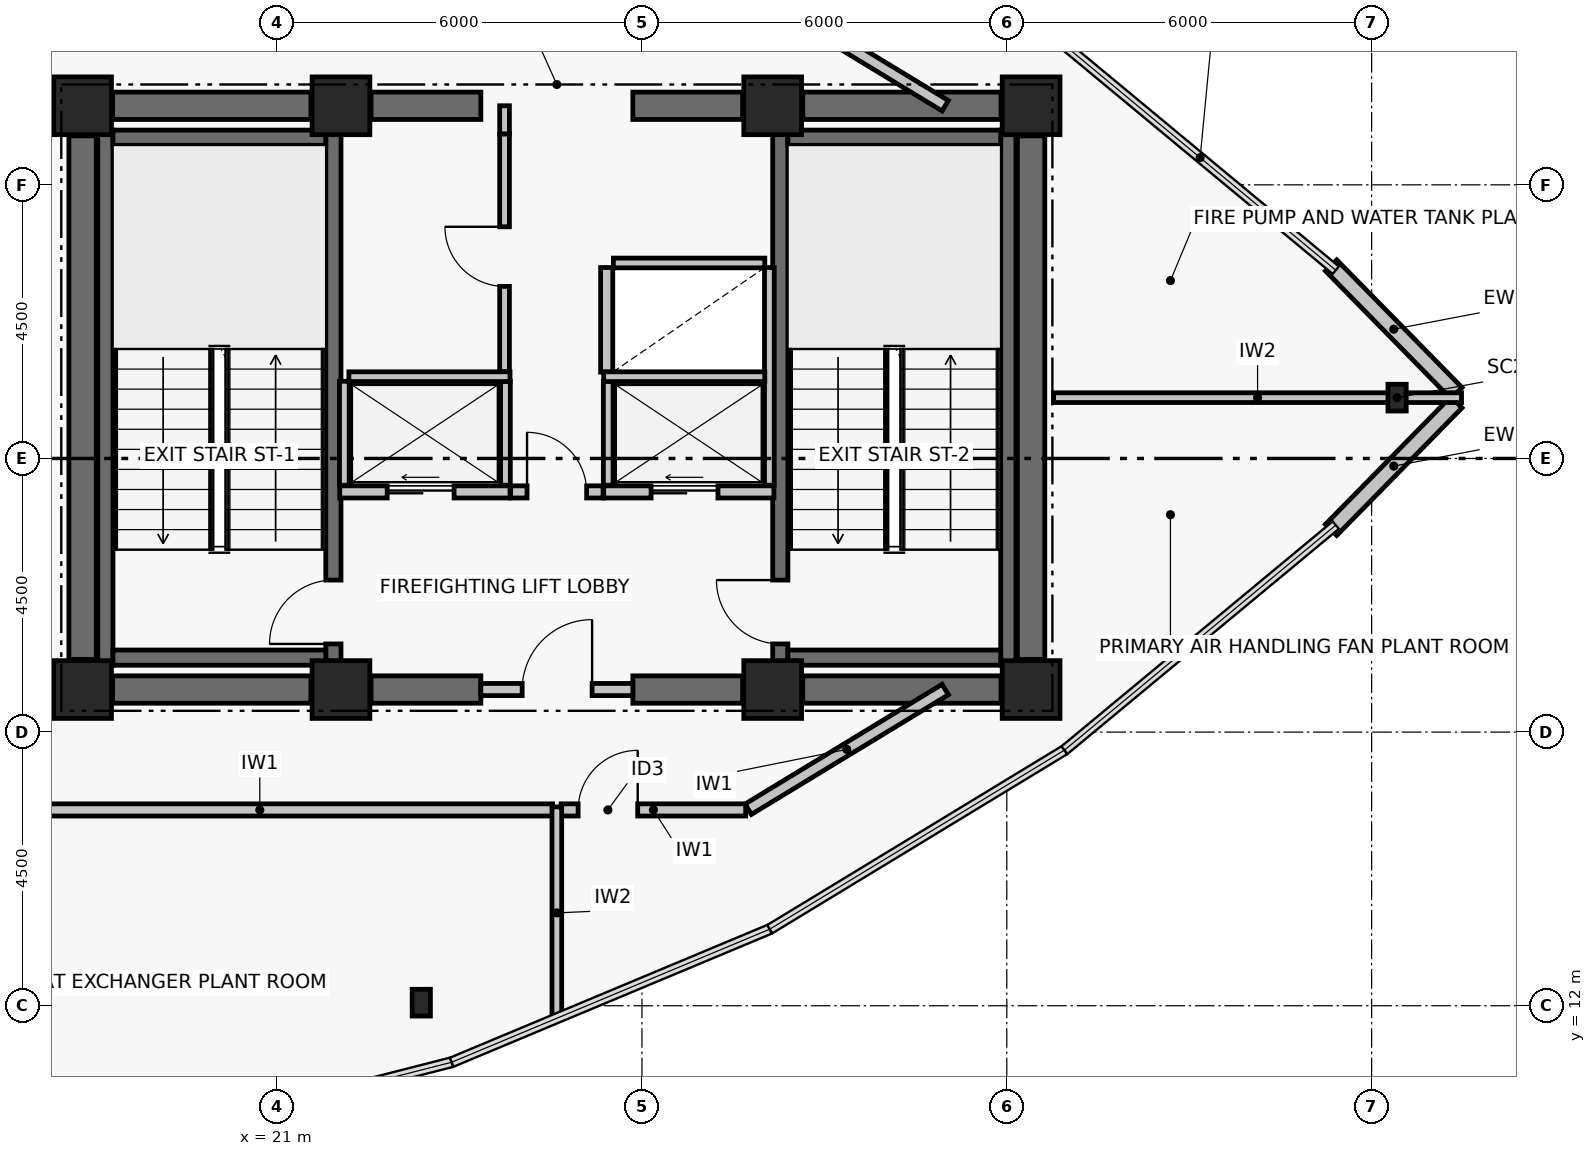
"""IFC4 building model, lengths in metres.
Left out: names, types, materials, properties, quantities, classifications, styles, units other than length and angle.
Written with IfcOpenShell. Run it as: python <this file> out.ifc"""

import sys

from ifc_helpers import new_model, si_unit, direction, frame, frame_2d, origin, origin_2d, place, context, subcontext, project, spatial, rectangle, i_section, extrude, element, fill, save


model = new_model("IFC4")
c1 = context("Model", 3, precision=1e-05, world=origin(), true_north=direction((0.0, 1.0)))
c2 = subcontext(c1, "Body", "Model", "MODEL_VIEW")
j1 = project(units=[si_unit("LENGTHUNIT", "METRE"), si_unit("PLANEANGLEUNIT", "RADIAN")], contexts=[c1])
p1 = place(None, origin())
s1 = spatial("IfcSite", under=j1, at=p1, CompositionType="ELEMENT")
p2 = place(p1, origin())
s2 = spatial("IfcBuilding", under=s1, at=p2, CompositionType="ELEMENT")
p3 = place(p2, frame((0.0, 0.0, 299.22)))
s3 = spatial("IfcBuildingStorey", under=s2, at=p3, CompositionType="ELEMENT", Elevation=299.22)
for number, where, z_axis, x_axis in (
    (1, (17.8, 17.2, 0.0), (0.0, 0.0, 1.0), (1.0, 0.0, 0.0)),
    (2, (22.05, 17.2, 0.0), (0.0, 0.0, 1.0), (1.0, 0.0, 0.0)),
    (3, (29.15, 17.2, 0.0), (0.0, 0.0, 1.0), (1.0, 0.0, 0.0)),
    (4, (33.4, 17.2, 0.0), (0.0, 0.0, 1.0), (1.0, 0.0, 0.0)),
    (5, (17.8, 26.8, 0.0), (0.0, 0.0, 1.0), (1.0, 0.0, 0.0)),
    (6, (22.05, 26.8, 0.0), (0.0, 0.0, 1.0), (1.0, 0.0, 0.0)),
    (7, (29.15, 26.8, 0.0), (0.0, 0.0, 1.0), (1.0, 0.0, 0.0)),
    (8, (33.4, 26.8, 0.0), (0.0, 0.0, 1.0), (1.0, 0.0, 0.0)),
):
    element("IfcColumn", number, at=place(p3, frame(where, z_axis=z_axis, x_axis=x_axis)), inside=s3, PredefinedType="COLUMN", context=c2, shape_type="SweptSolid", body=[
        extrude(rectangle(XDim=0.95, YDim=0.95, at=origin_2d()), origin(), (0.0, 0.0, 1.0), 3.2),
    ])
p4 = place(p3, frame((18.295, 17.2, 0.0), z_axis=(0.0, 0.0, 1.0), x_axis=(1.0, 0.0, 0.0)))
e9 = element("IfcWall", 9, at=p4, inside=s3, PredefinedType="SHEAR", context=c2, shape_type="SweptSolid", body=[
    extrude(rectangle(XDim=3.26, YDim=0.45, at=frame_2d((1.63, 0.0))), origin(), (0.0, 0.0, 1.0), 2.98),
])
p5 = place(p3, frame((22.545, 17.2, 0.0), z_axis=(0.0, 0.0, 1.0), x_axis=(1.0, 0.0, 0.0)))
e10 = element("IfcWall", 10, at=p5, inside=s3, PredefinedType="SHEAR", context=c2, shape_type="SweptSolid", body=[
    extrude(rectangle(XDim=1.805, YDim=0.45, at=frame_2d((0.903, 0.0))), origin(), (0.0, 0.0, 1.0), 2.98),
])
p6 = place(p3, frame((26.85, 17.2, 0.0), z_axis=(0.0, 0.0, 1.0), x_axis=(1.0, 0.0, 0.0)))
e11 = element("IfcWall", 11, at=p6, inside=s3, PredefinedType="SHEAR", context=c2, shape_type="SweptSolid", body=[
    extrude(rectangle(XDim=1.805, YDim=0.45, at=frame_2d((0.902, 0.0))), origin(), (0.0, 0.0, 1.0), 2.98),
])
for number, where, z_axis, x_axis in (
    (12, (29.645, 17.2, 0.0), (0.0, 0.0, 1.0), (1.0, 0.0, 0.0)),
    (13, (18.295, 26.8, 0.0), (0.0, 0.0, 1.0), (1.0, 0.0, 0.0)),
):
    element("IfcWall", number, at=place(p3, frame(where, z_axis=z_axis, x_axis=x_axis)), inside=s3, PredefinedType="SHEAR", context=c2, shape_type="SweptSolid", body=[
        extrude(rectangle(XDim=3.26, YDim=0.45, at=frame_2d((1.63, 0.0))), origin(), (0.0, 0.0, 1.0), 2.98),
    ])
p7 = place(p3, frame((22.545, 26.8, 0.0), z_axis=(0.0, 0.0, 1.0), x_axis=(1.0, 0.0, 0.0)))
e14 = element("IfcWall", 14, at=p7, inside=s3, PredefinedType="SHEAR", context=c2, shape_type="SweptSolid", body=[
    extrude(rectangle(XDim=1.805, YDim=0.45, at=frame_2d((0.903, 0.0))), origin(), (0.0, 0.0, 1.0), 2.98),
])
p8 = place(p3, frame((26.85, 26.8, 0.0), z_axis=(0.0, 0.0, 1.0), x_axis=(1.0, 0.0, 0.0)))
e15 = element("IfcWall", 15, at=p8, inside=s3, PredefinedType="SHEAR", context=c2, shape_type="SweptSolid", body=[
    extrude(rectangle(XDim=1.805, YDim=0.45, at=frame_2d((0.902, 0.0))), origin(), (0.0, 0.0, 1.0), 2.98),
])
p9 = place(p3, frame((29.645, 26.8, 0.0), z_axis=(0.0, 0.0, 1.0), x_axis=(1.0, 0.0, 0.0)))
e16 = element("IfcWall", 16, at=p9, inside=s3, PredefinedType="SHEAR", context=c2, shape_type="SweptSolid", body=[
    extrude(rectangle(XDim=3.26, YDim=0.45, at=frame_2d((1.63, 0.0))), origin(), (0.0, 0.0, 1.0), 2.98),
])
for number, where, z_axis, x_axis in (
    (17, (17.8, 17.695, 0.0), (0.0, 0.0, 1.0), (0.0, 1.0, 0.0)),
    (18, (33.4, 17.695, 0.0), (0.0, 0.0, 1.0), (0.0, 1.0, 0.0)),
):
    element("IfcWall", number, at=place(p3, frame(where, z_axis=z_axis, x_axis=x_axis)), inside=s3, PredefinedType="SHEAR", context=c2, shape_type="SweptSolid", body=[
        extrude(rectangle(XDim=8.61, YDim=0.45, at=frame_2d((4.305, 0.0))), origin(), (0.0, 0.0, 1.0), 2.98),
    ])
p10 = place(p3, frame((18.175, 17.6, 0.0), z_axis=(0.0, 0.0, 1.0), x_axis=(0.0, 1.0, 0.0)))
e19 = element("IfcWall", 19, at=p10, inside=s3, PredefinedType="SHEAR", context=c2, shape_type="SweptSolid", body=[
    extrude(rectangle(XDim=8.8, YDim=0.25, at=frame_2d((4.4, 0.0))), origin(), (0.0, 0.0, 1.0), 2.98),
])
p11 = place(p3, frame((21.925, 17.6, 0.0), z_axis=(0.0, 0.0, 1.0), x_axis=(0.0, 1.0, 0.0)))
e20 = element("IfcWall", 20, at=p11, inside=s3, PredefinedType="SHEAR", context=c2, shape_type="SweptSolid", body=[
    extrude(rectangle(XDim=8.8, YDim=0.25, at=frame_2d((4.4, 0.0))), origin(), (0.0, 0.0, 1.0), 2.98),
])
p12 = place(p11, frame((0.35, 0.0, 0.0)))
e21 = element("IfcOpeningElement", 21, at=p12, cuts=e20, PredefinedType="OPENING", context=c2, shape_type="SweptSolid", body=[
    extrude(rectangle(XDim=1.05, YDim=2.08, at=frame_2d((0.525, 1.04))), frame((0.0, 0.135, 0.0), z_axis=(0.0, -1.0, 0.0), x_axis=(1.0, 0.0, 0.0)), (0.0, 0.0, 1.0), 0.27),
])
for number, where, z_axis, x_axis in (
    (22, (18.3, 17.725, 0.0), (0.0, 0.0, 1.0), (1.0, 0.0, 0.0)),
    (23, (18.3, 26.275, 0.0), (0.0, 0.0, 1.0), (1.0, 0.0, 0.0)),
):
    element("IfcWall", number, at=place(p3, frame(where, z_axis=z_axis, x_axis=x_axis)), inside=s3, PredefinedType="SHEAR", context=c2, shape_type="SweptSolid", body=[
        extrude(rectangle(XDim=3.5, YDim=0.25, at=frame_2d((1.75, 0.0))), origin(), (0.0, 0.0, 1.0), 2.98),
    ])
p13 = place(p3, frame((29.275, 17.6, 0.0), z_axis=(0.0, 0.0, 1.0), x_axis=(0.0, 1.0, 0.0)))
e24 = element("IfcWall", 24, at=p13, inside=s3, PredefinedType="SHEAR", context=c2, shape_type="SweptSolid", body=[
    extrude(rectangle(XDim=8.8, YDim=0.25, at=frame_2d((4.4, 0.0))), origin(), (0.0, 0.0, 1.0), 2.98),
])
p14 = place(p13, frame((0.35, 0.0, 0.0)))
e25 = element("IfcOpeningElement", 25, at=p14, cuts=e24, PredefinedType="OPENING", context=c2, shape_type="SweptSolid", body=[
    extrude(rectangle(XDim=1.05, YDim=2.08, at=frame_2d((0.525, 1.04))), frame((0.0, 0.135, 0.0), z_axis=(0.0, -1.0, 0.0), x_axis=(1.0, 0.0, 0.0)), (0.0, 0.0, 1.0), 0.27),
])
p15 = place(p3, frame((33.025, 17.6, 0.0), z_axis=(0.0, 0.0, 1.0), x_axis=(0.0, 1.0, 0.0)))
e26 = element("IfcWall", 26, at=p15, inside=s3, PredefinedType="SHEAR", context=c2, shape_type="SweptSolid", body=[
    extrude(rectangle(XDim=8.8, YDim=0.25, at=frame_2d((4.4, 0.0))), origin(), (0.0, 0.0, 1.0), 2.98),
])
for number, where, z_axis, x_axis in (
    (27, (29.4, 17.725, 0.0), (0.0, 0.0, 1.0), (1.0, 0.0, 0.0)),
    (28, (29.4, 26.275, 0.0), (0.0, 0.0, 1.0), (1.0, 0.0, 0.0)),
):
    element("IfcWall", number, at=place(p3, frame(where, z_axis=z_axis, x_axis=x_axis)), inside=s3, PredefinedType="SHEAR", context=c2, shape_type="SweptSolid", body=[
        extrude(rectangle(XDim=3.5, YDim=0.25, at=frame_2d((1.75, 0.0))), origin(), (0.0, 0.0, 1.0), 2.98),
    ])
for number, where, z_axis, x_axis in (
    (29, (39.419, 22.0, 0.0), (0.0, 0.0, 1.0), (1.0, 0.0, 0.0)),
    (30, (23.371, 12.051, 0.0), (0.0, 0.0, 1.0), (1.0, 0.0, 0.0)),
):
    element("IfcColumn", number, at=place(p3, frame(where, z_axis=z_axis, x_axis=x_axis)), inside=s3, PredefinedType="COLUMN", context=c2, shape_type="SweptSolid", body=[
        extrude(i_section(OverallWidth=0.3, OverallDepth=0.44, WebThickness=0.011, FlangeThickness=0.018, at=origin_2d()), origin(), (0.0, 0.0, 1.0), 3.2),
    ])
for number, where, z_axis, x_axis in (
    (31, (40.394, 21.924, 0.0), (0.0, 0.0, 1.0), (-0.701, -0.714, 0.0)),
    (32, (38.333, 24.175, 0.0), (0.0, 0.0, 1.0), (0.701, -0.714, 0.0)),
):
    element("IfcWall", number, at=place(p3, frame(where, z_axis=z_axis, x_axis=x_axis)), inside=s3, PredefinedType="PARTITIONING", context=c2, shape_type="SweptSolid", body=[
        extrude(rectangle(XDim=2.941, YDim=0.26, at=frame_2d((1.471, 0.0))), origin(), (0.0, 0.0, 1.0), 2.98),
    ])
p16 = place(p3, frame((24.35, 17.2, 0.0), z_axis=(0.0, 0.0, 1.0), x_axis=(1.0, 0.0, 0.0)))
e33 = element("IfcWall", 33, at=p16, inside=s3, PredefinedType="PARTITIONING", context=c2, shape_type="SweptSolid", body=[
    extrude(rectangle(XDim=2.5, YDim=0.2, at=frame_2d((1.25, 0.0))), origin(), (0.0, 0.0, 1.0), 2.11),
])
p17 = place(p16, frame((0.68, 0.0, 0.0)))
e34 = element("IfcOpeningElement", 34, at=p17, cuts=e33, PredefinedType="OPENING", context=c2, shape_type="SweptSolid", body=[
    extrude(rectangle(XDim=1.15, YDim=2.08, at=frame_2d((0.575, 1.04))), frame((0.0, 0.11, 0.0), z_axis=(0.0, -1.0, 0.0), x_axis=(1.0, 0.0, 0.0)), (0.0, 0.0, 1.0), 0.22),
])
p18 = place(p3, frame((24.84, 20.45, 0.0), z_axis=(0.0, 0.0, 1.0), x_axis=(1.0, 0.0, 0.0)))
e35 = element("IfcWall", 35, at=p18, inside=s3, PredefinedType="PARTITIONING", context=c2, shape_type="SweptSolid", body=[
    extrude(rectangle(XDim=1.52, YDim=0.2, at=frame_2d((0.76, 0.0))), origin(), (0.0, 0.0, 1.0), 2.98),
])
p19 = place(p18, frame((0.27, 0.0, 0.0)))
e36 = element("IfcOpeningElement", 36, at=p19, cuts=e35, PredefinedType="OPENING", context=c2, shape_type="SweptSolid", body=[
    extrude(rectangle(XDim=0.98, YDim=2.06, at=frame_2d((0.49, 1.03))), frame((0.0, 0.11, 0.0), z_axis=(0.0, -1.0, 0.0), x_axis=(1.0, 0.0, 0.0)), (0.0, 0.0, 1.0), 0.22),
])
p20 = place(p3, frame((22.03, 20.45, 0.0), z_axis=(0.0, 0.0, 1.0), x_axis=(1.0, 0.0, 0.0)))
e37 = element("IfcWall", 37, at=p20, inside=s3, PredefinedType="PARTITIONING", context=c2, shape_type="SweptSolid", body=[
    extrude(rectangle(XDim=2.8, YDim=0.2, at=frame_2d((1.4, 0.0))), origin(), (0.0, 0.0, 1.0), 2.98),
])
p21 = place(p20, frame((0.78, 0.0, 0.0)))
e38 = element("IfcOpeningElement", 38, at=p21, cuts=e37, PredefinedType="OPENING", context=c2, shape_type="SweptSolid", body=[
    extrude(rectangle(XDim=1.1, YDim=2.08, at=frame_2d((0.55, 1.04))), frame((0.0, 0.11, 0.0), z_axis=(0.0, -1.0, 0.0), x_axis=(1.0, 0.0, 0.0)), (0.0, 0.0, 1.0), 0.22),
])
p22 = place(p3, frame((26.37, 20.45, 0.0), z_axis=(0.0, 0.0, 1.0), x_axis=(1.0, 0.0, 0.0)))
e39 = element("IfcWall", 39, at=p22, inside=s3, PredefinedType="PARTITIONING", context=c2, shape_type="SweptSolid", body=[
    extrude(rectangle(XDim=2.8, YDim=0.2, at=frame_2d((1.4, 0.0))), origin(), (0.0, 0.0, 1.0), 2.98),
])
p23 = place(p22, frame((0.78, 0.0, 0.0)))
e40 = element("IfcOpeningElement", 40, at=p23, cuts=e39, PredefinedType="OPENING", context=c2, shape_type="SweptSolid", body=[
    extrude(rectangle(XDim=1.1, YDim=2.08, at=frame_2d((0.55, 1.04))), frame((0.0, 0.11, 0.0), z_axis=(0.0, -1.0, 0.0), x_axis=(1.0, 0.0, 0.0)), (0.0, 0.0, 1.0), 0.22),
])
p24 = place(p3, frame((26.42, 22.42, 0.0), z_axis=(0.0, 0.0, 1.0), x_axis=(0.0, 1.0, 0.0)))
e41 = element("IfcWall", 41, at=p24, inside=s3, PredefinedType="PARTITIONING", context=c2, shape_type="SweptSolid", body=[
    extrude(rectangle(XDim=1.72, YDim=0.2, at=frame_2d((0.86, 0.0))), origin(), (0.0, 0.0, 1.0), 2.98),
])
for number, where, z_axis, x_axis in (
    (42, (22.105, 20.56, 0.0), (0.0, 0.0, 1.0), (0.0, 1.0, 0.0)),
    (43, (24.755, 20.56, 0.0), (0.0, 0.0, 1.0), (0.0, 1.0, 0.0)),
):
    element("IfcWall", number, at=place(p3, frame(where, z_axis=z_axis, x_axis=x_axis)), inside=s3, PredefinedType="PARTITIONING", context=c2, shape_type="SweptSolid", body=[
        extrude(rectangle(XDim=1.71, YDim=0.16, at=frame_2d((0.855, 0.0))), origin(), (0.0, 0.0, 1.0), 2.98),
    ])
p25 = place(p3, frame((22.18, 22.345, 0.0), z_axis=(0.0, 0.0, 1.0), x_axis=(1.0, 0.0, 0.0)))
e44 = element("IfcWall", 44, at=p25, inside=s3, PredefinedType="PARTITIONING", context=c2, shape_type="SweptSolid", body=[
    extrude(rectangle(XDim=2.65, YDim=0.16, at=frame_2d((1.325, 0.0))), origin(), (0.0, 0.0, 1.0), 2.98),
])
p26 = place(p3, frame((29.095, 20.56, 0.0), z_axis=(0.0, 0.0, 1.0), x_axis=(0.0, 1.0, 0.0)))
e45 = element("IfcWall", 45, at=p26, inside=s3, PredefinedType="PARTITIONING", context=c2, shape_type="SweptSolid", body=[
    extrude(rectangle(XDim=3.58, YDim=0.16, at=frame_2d((1.79, 0.0))), origin(), (0.0, 0.0, 1.0), 2.98),
])
p27 = place(p3, frame((26.445, 20.56, 0.0), z_axis=(0.0, 0.0, 1.0), x_axis=(0.0, 1.0, 0.0)))
e46 = element("IfcWall", 46, at=p27, inside=s3, PredefinedType="PARTITIONING", context=c2, shape_type="SweptSolid", body=[
    extrude(rectangle(XDim=1.71, YDim=0.16, at=frame_2d((0.855, 0.0))), origin(), (0.0, 0.0, 1.0), 2.98),
])
p28 = place(p3, frame((26.37, 22.345, 0.0), z_axis=(0.0, 0.0, 1.0), x_axis=(1.0, 0.0, 0.0)))
e47 = element("IfcWall", 47, at=p28, inside=s3, PredefinedType="PARTITIONING", context=c2, shape_type="SweptSolid", body=[
    extrude(rectangle(XDim=2.65, YDim=0.16, at=frame_2d((1.325, 0.0))), origin(), (0.0, 0.0, 1.0), 2.98),
])
p29 = place(p3, frame((26.53, 24.215, 0.0), z_axis=(0.0, 0.0, 1.0), x_axis=(1.0, 0.0, 0.0)))
e48 = element("IfcWall", 48, at=p29, inside=s3, PredefinedType="PARTITIONING", context=c2, shape_type="SweptSolid", body=[
    extrude(rectangle(XDim=2.49, YDim=0.16, at=frame_2d((1.245, 0.0))), origin(), (0.0, 0.0, 1.0), 2.98),
])
p30 = place(p3, frame((24.74, 26.335, 0.0), z_axis=(0.0, 0.0, 1.0), x_axis=(0.0, 1.0, 0.0)))
e49 = element("IfcWall", 49, at=p30, inside=s3, PredefinedType="PARTITIONING", context=c2, shape_type="SweptSolid", body=[
    extrude(rectangle(XDim=0.465, YDim=0.16, at=frame_2d((0.232, 0.0))), origin(), (0.0, 0.0, 1.0), 2.11),
])
p31 = place(p3, frame((24.74, 22.43, 0.0), z_axis=(0.0, 0.0, 1.0), x_axis=(0.0, 1.0, 0.0)))
e50 = element("IfcWall", 50, at=p31, inside=s3, PredefinedType="PARTITIONING", context=c2, shape_type="SweptSolid", body=[
    extrude(rectangle(XDim=3.905, YDim=0.16, at=frame_2d((1.953, 0.0))), origin(), (0.0, 0.0, 1.0), 2.98),
])
p32 = place(p31, frame((1.4, 0.0, 0.0)))
e51 = element("IfcOpeningElement", 51, at=p32, cuts=e50, PredefinedType="OPENING", context=c2, shape_type="SweptSolid", body=[
    extrude(rectangle(XDim=0.98, YDim=2.06, at=frame_2d((0.49, 1.03))), frame((0.0, 0.09, 0.0), z_axis=(0.0, -1.0, 0.0), x_axis=(1.0, 0.0, 0.0)), (0.0, 0.0, 1.0), 0.18),
])
p33 = place(p3, frame((15.9, 15.22, 0.0), z_axis=(0.0, 0.0, 1.0), x_axis=(1.0, 0.0, 0.0)))
e52 = element("IfcWall", 52, at=p33, inside=s3, PredefinedType="PARTITIONING", context=c2, shape_type="SweptSolid", body=[
    extrude(rectangle(XDim=9.63, YDim=0.2, at=frame_2d((4.815, 0.0))), origin(), (0.0, 0.0, 1.0), 2.31),
])
p34 = place(p3, frame((25.67, 15.22, 0.0), z_axis=(0.0, 0.0, 1.0), x_axis=(1.0, 0.0, 0.0)))
e53 = element("IfcWall", 53, at=p34, inside=s3, PredefinedType="PARTITIONING", context=c2, shape_type="SweptSolid", body=[
    extrude(rectangle(XDim=3.036, YDim=0.2, at=frame_2d((1.518, 0.0))), origin(), (0.0, 0.0, 1.0), 2.98),
])
p35 = place(p34, frame((0.28, 0.0, 0.0)))
e54 = element("IfcOpeningElement", 54, at=p35, cuts=e53, PredefinedType="OPENING", context=c2, shape_type="SweptSolid", body=[
    extrude(rectangle(XDim=0.98, YDim=2.06, at=frame_2d((0.49, 1.03))), frame((0.0, 0.11, 0.0), z_axis=(0.0, -1.0, 0.0), x_axis=(1.0, 0.0, 0.0)), (0.0, 0.0, 1.0), 0.22),
])
for number, where, z_axis, x_axis in (
    (55, (28.747, 15.232, 0.0), (0.0, 0.0, 1.0), (0.855, 0.519, 0.0)),
    (56, (31.988, 26.8, 0.0), (0.0, 0.0, 1.0), (-0.855, 0.519, 0.0)),
):
    element("IfcWall", number, at=place(p3, frame(where, z_axis=z_axis, x_axis=x_axis)), inside=s3, PredefinedType="PARTITIONING", context=c2, shape_type="SweptSolid", body=[
        extrude(rectangle(XDim=3.792, YDim=0.2, at=frame_2d((1.896, 0.0))), origin(), (0.0, 0.0, 1.0), 2.11),
    ])
p36 = place(p3, frame((25.6, 11.783, 0.0), z_axis=(0.0, 0.0, 1.0), x_axis=(0.0, 1.0, 0.0)))
e57 = element("IfcWall", 57, at=p36, inside=s3, PredefinedType="PARTITIONING", context=c2, shape_type="SweptSolid", body=[
    extrude(rectangle(XDim=3.487, YDim=0.16, at=frame_2d((1.743, 0.0))), origin(), (0.0, 0.0, 1.0), 2.46),
])
p37 = place(p3, frame((33.77, 22.0, 0.0), z_axis=(0.0, 0.0, 1.0), x_axis=(1.0, 0.0, 0.0)))
e58 = element("IfcWall", 58, at=p37, inside=s3, PredefinedType="PARTITIONING", context=c2, shape_type="SweptSolid", body=[
    extrude(rectangle(XDim=6.709, YDim=0.16, at=frame_2d((3.354, 0.0))), origin(), (0.0, 0.0, 1.0), 2.11),
])
p38 = place(p12, origin())
e59 = element("IfcDoor", 59, at=p38, inside=s3, OperationType="SINGLE_SWING_LEFT", PredefinedType="DOOR", context=c2, shape_type="SweptSolid", body=[
    extrude(rectangle(XDim=1.05, YDim=2.08, at=frame_2d((0.525, 1.04))), frame((0.0, 0.025, 0.0), z_axis=(0.0, -1.0, 0.0), x_axis=(1.0, 0.0, 0.0)), (0.0, 0.0, 1.0), 0.05),
])
fill(e21, e59)
p39 = place(p14, origin())
e60 = element("IfcDoor", 60, at=p39, inside=s3, OperationType="SINGLE_SWING_RIGHT", PredefinedType="DOOR", context=c2, shape_type="SweptSolid", body=[
    extrude(rectangle(XDim=1.05, YDim=2.08, at=frame_2d((0.525, 1.04))), frame((0.0, 0.025, 0.0), z_axis=(0.0, -1.0, 0.0), x_axis=(1.0, 0.0, 0.0)), (0.0, 0.0, 1.0), 0.05),
])
fill(e25, e60)
p40 = place(p17, origin())
e61 = element("IfcDoor", 61, at=p40, inside=s3, OperationType="SINGLE_SWING_RIGHT", PredefinedType="DOOR", context=c2, shape_type="SweptSolid", body=[
    extrude(rectangle(XDim=1.15, YDim=2.08, at=frame_2d((0.575, 1.04))), frame((0.0, 0.025, 0.0), z_axis=(0.0, -1.0, 0.0), x_axis=(1.0, 0.0, 0.0)), (0.0, 0.0, 1.0), 0.05),
])
fill(e34, e61)
p41 = place(p19, origin())
e62 = element("IfcDoor", 62, at=p41, inside=s3, OperationType="SINGLE_SWING_LEFT", PredefinedType="DOOR", context=c2, shape_type="SweptSolid", body=[
    extrude(rectangle(XDim=0.98, YDim=2.06, at=frame_2d((0.49, 1.03))), frame((0.0, 0.025, 0.0), z_axis=(0.0, -1.0, 0.0), x_axis=(1.0, 0.0, 0.0)), (0.0, 0.0, 1.0), 0.05),
])
fill(e36, e62)
p42 = place(p21, origin())
e63 = element("IfcDoor", 63, at=p42, inside=s3, OperationType="DOUBLE_DOOR_SLIDING", PredefinedType="DOOR", context=c2, shape_type="SweptSolid", body=[
    extrude(rectangle(XDim=1.1, YDim=2.08, at=frame_2d((0.55, 1.04))), frame((0.0, 0.025, 0.0), z_axis=(0.0, -1.0, 0.0), x_axis=(1.0, 0.0, 0.0)), (0.0, 0.0, 1.0), 0.05),
])
fill(e38, e63)
p43 = place(p23, origin())
e64 = element("IfcDoor", 64, at=p43, inside=s3, OperationType="DOUBLE_DOOR_SLIDING", PredefinedType="DOOR", context=c2, shape_type="SweptSolid", body=[
    extrude(rectangle(XDim=1.1, YDim=2.08, at=frame_2d((0.55, 1.04))), frame((0.0, 0.025, 0.0), z_axis=(0.0, -1.0, 0.0), x_axis=(1.0, 0.0, 0.0)), (0.0, 0.0, 1.0), 0.05),
])
fill(e40, e64)
p44 = place(p32, origin())
e65 = element("IfcDoor", 65, at=p44, inside=s3, OperationType="SINGLE_SWING_RIGHT", PredefinedType="DOOR", context=c2, shape_type="SweptSolid", body=[
    extrude(rectangle(XDim=0.98, YDim=2.06, at=frame_2d((0.49, 1.03))), frame((0.0, 0.025, 0.0), z_axis=(0.0, -1.0, 0.0), x_axis=(1.0, 0.0, 0.0)), (0.0, 0.0, 1.0), 0.05),
])
fill(e51, e65)
p45 = place(p35, origin())
e66 = element("IfcDoor", 66, at=p45, inside=s3, OperationType="SINGLE_SWING_RIGHT", PredefinedType="DOOR", context=c2, shape_type="SweptSolid", body=[
    extrude(rectangle(XDim=0.98, YDim=2.06, at=frame_2d((0.49, 1.03))), frame((0.0, 0.025, 0.0), z_axis=(0.0, -1.0, 0.0), x_axis=(1.0, 0.0, 0.0)), (0.0, 0.0, 1.0), 0.05),
])
fill(e54, e66)
save(model, sys.argv[1])
